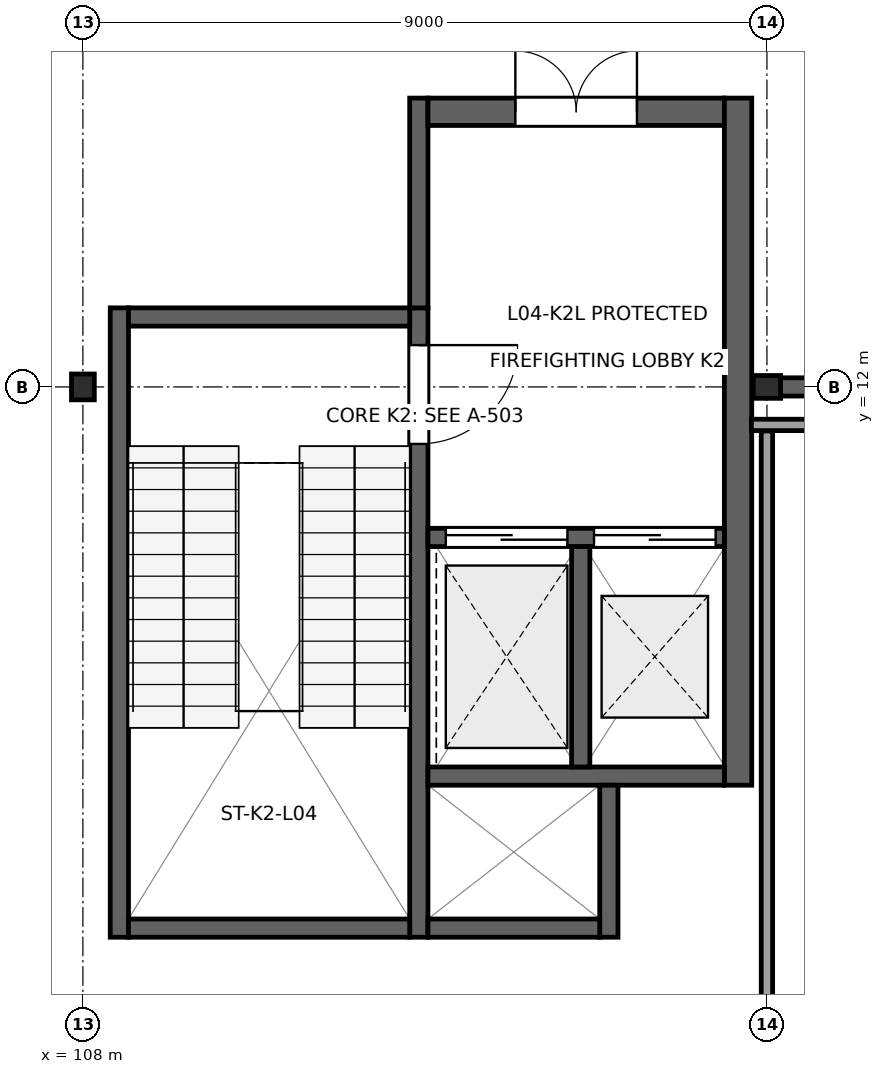
"""IFC4 building model, lengths in metres.
Left out: names, types, materials, properties, quantities, classifications, styles, units other than length and angle.
Written with IfcOpenShell. Run it as: python <this file> out.ifc"""

import sys

from ifc_helpers import new_model, si_unit, direction, frame, frame_2d, origin, origin_2d, place, context, subcontext, project, spatial, rectangle, i_section, extrude, element, fill, save


model = new_model("IFC4")
c1 = context("Model", 3, precision=1e-05, world=origin(), true_north=direction((0.0, 1.0)))
c2 = subcontext(c1, "Body", "Model", "MODEL_VIEW")
j1 = project(units=[si_unit("LENGTHUNIT", "METRE"), si_unit("PLANEANGLEUNIT", "RADIAN")], contexts=[c1])
p1 = place(None, origin())
s1 = spatial("IfcSite", under=j1, at=p1, CompositionType="ELEMENT")
p2 = place(p1, origin())
s2 = spatial("IfcBuilding", under=s1, at=p2, CompositionType="ELEMENT")
p3 = place(p2, frame((0.0, 0.0, 18.9)))
s3 = spatial("IfcBuildingStorey", under=s2, at=p3, CompositionType="ELEMENT", Elevation=18.9)
p4 = place(p3, frame((108.0, 12.0, 0.0), z_axis=(0.0, 0.0, 1.0), x_axis=(1.0, 0.0, 0.0)))
e1 = element("IfcColumn", 1, at=p4, inside=s3, PredefinedType="COLUMN", context=c2, shape_type="SweptSolid", body=[
    extrude(i_section(OverallWidth=0.3, OverallDepth=0.34, WebThickness=0.012, FlangeThickness=0.021, at=origin_2d()), origin(), (0.0, 0.0, 1.0), 4.5),
])
p5 = place(p3, frame((117.0, 12.0, 0.0), z_axis=(0.0, 0.0, 1.0), x_axis=(0.0, 1.0, 0.0)))
e2 = element("IfcColumn", 2, at=p5, inside=s3, PredefinedType="COLUMN", context=c2, shape_type="SweptSolid", body=[
    extrude(i_section(OverallWidth=0.3, OverallDepth=0.36, WebThickness=0.012, FlangeThickness=0.022, at=origin_2d()), origin(), (0.0, 0.0, 1.0), 4.5),
])
p6 = place(p3, frame((108.48, 4.76, 0.0), z_axis=(0.0, 0.0, 1.0), x_axis=(0.0, 1.0, 0.0)))
e3 = element("IfcWall", 3, at=p6, inside=s3, PredefinedType="SHEAR", context=c2, shape_type="SweptSolid", body=[
    extrude(rectangle(XDim=8.28, YDim=0.24, at=frame_2d((4.14, 0.0))), origin(), (0.0, 0.0, 1.0), 4.31),
])
p7 = place(p3, frame((112.42, 4.76, 0.0), z_axis=(0.0, 0.0, 1.0), x_axis=(0.0, 1.0, 0.0)))
e4 = element("IfcWall", 4, at=p7, inside=s3, PredefinedType="SHEAR", context=c2, shape_type="SweptSolid", body=[
    extrude(rectangle(XDim=8.28, YDim=0.24, at=frame_2d((4.14, 0.0))), origin(), (0.0, 0.0, 1.0), 4.31),
])
p8 = place(p7, frame((6.49, 0.0, 0.0)))
e5 = element("IfcOpeningElement", 5, at=p8, cuts=e4, PredefinedType="OPENING", context=c2, shape_type="SweptSolid", body=[
    extrude(rectangle(XDim=1.3, YDim=2.2, at=frame_2d((0.65, 1.1))), frame((0.0, 0.135, 0.0), z_axis=(0.0, -1.0, 0.0), x_axis=(1.0, 0.0, 0.0)), (0.0, 0.0, 1.0), 0.27),
])
for number, where, z_axis, x_axis in (
    (6, (108.6, 4.88, 0.0), (0.0, 0.0, 1.0), (1.0, 0.0, 0.0)),
    (7, (108.6, 12.92, 0.0), (0.0, 0.0, 1.0), (1.0, 0.0, 0.0)),
):
    element("IfcWall", number, at=place(p3, frame(where, z_axis=z_axis, x_axis=x_axis)), inside=s3, PredefinedType="SHEAR", context=c2, shape_type="SweptSolid", body=[
        extrude(rectangle(XDim=3.7, YDim=0.24, at=frame_2d((1.85, 0.0))), origin(), (0.0, 0.0, 1.0), 4.31),
    ])
p9 = place(p3, frame((112.42, 13.04, 0.0), z_axis=(0.0, 0.0, 1.0), x_axis=(0.0, 1.0, 0.0)))
e8 = element("IfcWall", 8, at=p9, inside=s3, PredefinedType="SHEAR", context=c2, shape_type="SweptSolid", body=[
    extrude(rectangle(XDim=2.76, YDim=0.24, at=frame_2d((1.38, 0.0))), origin(), (0.0, 0.0, 1.0), 4.16),
])
p10 = place(p3, frame((112.54, 15.62, 0.0), z_axis=(0.0, 0.0, 1.0), x_axis=(1.0, 0.0, 0.0)))
e9 = element("IfcWall", 9, at=p10, inside=s3, PredefinedType="SHEAR", context=c2, shape_type="SweptSolid", body=[
    extrude(rectangle(XDim=3.9, YDim=0.36, at=frame_2d((1.95, 0.0))), origin(), (0.0, 0.0, 1.0), 4.16),
])
p11 = place(p10, frame((1.15, 0.0, 0.0)))
e10 = element("IfcOpeningElement", 10, at=p11, cuts=e9, PredefinedType="OPENING", context=c2, shape_type="SweptSolid", body=[
    extrude(rectangle(XDim=1.6, YDim=2.25, at=frame_2d((0.8, 1.125))), frame((0.0, 0.195, 0.0), z_axis=(0.0, -1.0, 0.0), x_axis=(1.0, 0.0, 0.0)), (0.0, 0.0, 1.0), 0.39),
])
p12 = place(p3, frame((116.62, 6.76, 0.0), z_axis=(0.0, 0.0, 1.0), x_axis=(0.0, 1.0, 0.0)))
e11 = element("IfcWall", 11, at=p12, inside=s3, PredefinedType="SHEAR", context=c2, shape_type="SweptSolid", body=[
    extrude(rectangle(XDim=9.04, YDim=0.36, at=frame_2d((4.52, 0.0))), origin(), (0.0, 0.0, 1.0), 4.16),
])
p13 = place(p3, frame((112.54, 10.02, 0.0), z_axis=(0.0, 0.0, 1.0), x_axis=(1.0, 0.0, 0.0)))
e12 = element("IfcWall", 12, at=p13, inside=s3, PredefinedType="SHEAR", context=c2, shape_type="SweptSolid", body=[
    extrude(rectangle(XDim=3.9, YDim=0.24, at=frame_2d((1.95, 0.0))), origin(), (0.0, 0.0, 1.0), 4.31),
])
p14 = place(p13, frame((0.235, 0.0, 0.0)))
e13 = element("IfcOpeningElement", 13, at=p14, cuts=e12, PredefinedType="OPENING", context=c2, shape_type="SweptSolid", body=[
    extrude(rectangle(XDim=1.6, YDim=2.3, at=frame_2d((0.8, 1.15))), frame((0.0, 0.135, 0.0), z_axis=(0.0, -1.0, 0.0), x_axis=(1.0, 0.0, 0.0)), (0.0, 0.0, 1.0), 0.27),
])
p15 = place(p13, frame((2.185, 0.0, 0.0)))
e14 = element("IfcOpeningElement", 14, at=p15, cuts=e12, PredefinedType="OPENING", context=c2, shape_type="SweptSolid", body=[
    extrude(rectangle(XDim=1.6, YDim=2.3, at=frame_2d((0.8, 1.15))), frame((0.0, 0.135, 0.0), z_axis=(0.0, -1.0, 0.0), x_axis=(1.0, 0.0, 0.0)), (0.0, 0.0, 1.0), 0.27),
])
p16 = place(p3, frame((112.54, 6.88, 0.0), z_axis=(0.0, 0.0, 1.0), x_axis=(1.0, 0.0, 0.0)))
e15 = element("IfcWall", 15, at=p16, inside=s3, PredefinedType="SHEAR", context=c2, shape_type="SweptSolid", body=[
    extrude(rectangle(XDim=3.9, YDim=0.24, at=frame_2d((1.95, 0.0))), origin(), (0.0, 0.0, 1.0), 4.31),
])
p17 = place(p3, frame((114.55, 7.0, 0.0), z_axis=(0.0, 0.0, 1.0), x_axis=(0.0, 1.0, 0.0)))
e16 = element("IfcWall", 16, at=p17, inside=s3, PredefinedType="SHEAR", context=c2, shape_type="SweptSolid", body=[
    extrude(rectangle(XDim=2.9, YDim=0.24, at=frame_2d((1.45, 0.0))), origin(), (0.0, 0.0, 1.0), 4.31),
])
p18 = place(p3, frame((114.92, 4.76, 0.0), z_axis=(0.0, 0.0, 1.0), x_axis=(0.0, 1.0, 0.0)))
e17 = element("IfcWall", 17, at=p18, inside=s3, PredefinedType="SHEAR", context=c2, shape_type="SweptSolid", body=[
    extrude(rectangle(XDim=2.0, YDim=0.24, at=frame_2d((1.0, 0.0))), origin(), (0.0, 0.0, 1.0), 4.31),
])
p19 = place(p3, frame((112.54, 4.88, 0.0), z_axis=(0.0, 0.0, 1.0), x_axis=(1.0, 0.0, 0.0)))
e18 = element("IfcWall", 18, at=p19, inside=s3, PredefinedType="SHEAR", context=c2, shape_type="SweptSolid", body=[
    extrude(rectangle(XDim=2.26, YDim=0.24, at=frame_2d((1.13, 0.0))), origin(), (0.0, 0.0, 1.0), 4.31),
])
p20 = place(p3, frame((117.178, 12.0, 0.0), z_axis=(0.0, 0.0, 1.0), x_axis=(1.0, 0.0, 0.0)))
e19 = element("IfcWall", 19, at=p20, inside=s3, PredefinedType="SHEAR", context=c2, shape_type="SweptSolid", body=[
    extrude(rectangle(XDim=8.814, YDim=0.24, at=frame_2d((4.407, 0.0))), origin(), (0.0, 0.0, 1.0), 3.355),
])
p21 = place(p3, frame((117.0, 3.655, 0.0), z_axis=(0.0, 0.0, 1.0), x_axis=(0.0, 1.0, 0.0)))
e20 = element("IfcWall", 20, at=p21, inside=s3, PredefinedType="PARTITIONING", context=c2, shape_type="SweptSolid", body=[
    extrude(rectangle(XDim=7.765, YDim=0.15, at=frame_2d((3.882, 0.0))), origin(), (0.0, 0.0, 1.0), 3.905),
])
p22 = place(p3, frame((116.795, 11.5, 0.0), z_axis=(0.0, 0.0, 1.0), x_axis=(1.0, 0.0, 0.0)))
e21 = element("IfcWall", 21, at=p22, inside=s3, PredefinedType="PARTITIONING", context=c2, shape_type="SweptSolid", body=[
    extrude(rectangle(XDim=9.425, YDim=0.15, at=frame_2d((4.712, 0.0))), origin(), (0.0, 0.0, 1.0), 4.14),
])
p23 = place(p8, frame((1.3, 0.0, 0.0), z_axis=(0.0, 0.0, 1.0), x_axis=(-1.0, 0.0, 0.0)))
e22 = element("IfcDoor", 22, at=p23, inside=s3, OperationType="SINGLE_SWING_RIGHT", PredefinedType="DOOR", context=c2, shape_type="SweptSolid", body=[
    extrude(rectangle(XDim=1.3, YDim=2.2, at=frame_2d((0.65, 1.1))), frame((0.0, 0.025, 0.0), z_axis=(0.0, -1.0, 0.0), x_axis=(1.0, 0.0, 0.0)), (0.0, 0.0, 1.0), 0.05),
])
fill(e5, e22)
p24 = place(p11, origin())
e23 = element("IfcDoor", 23, at=p24, inside=s3, OperationType="DOUBLE_DOOR_SINGLE_SWING", PredefinedType="DOOR", context=c2, shape_type="SweptSolid", body=[
    extrude(rectangle(XDim=1.6, YDim=2.25, at=frame_2d((0.8, 1.125))), frame((0.0, 0.025, 0.0), z_axis=(0.0, -1.0, 0.0), x_axis=(1.0, 0.0, 0.0)), (0.0, 0.0, 1.0), 0.05),
])
fill(e10, e23)
p25 = place(p14, origin())
e24 = element("IfcDoor", 24, at=p25, inside=s3, OperationType="DOUBLE_DOOR_SLIDING", PredefinedType="DOOR", context=c2, shape_type="SweptSolid", body=[
    extrude(rectangle(XDim=1.6, YDim=2.3, at=frame_2d((0.8, 1.15))), frame((0.0, 0.025, 0.0), z_axis=(0.0, -1.0, 0.0), x_axis=(1.0, 0.0, 0.0)), (0.0, 0.0, 1.0), 0.05),
])
fill(e13, e24)
p26 = place(p15, origin())
e25 = element("IfcDoor", 25, at=p26, inside=s3, OperationType="DOUBLE_DOOR_SLIDING", PredefinedType="DOOR", context=c2, shape_type="SweptSolid", body=[
    extrude(rectangle(XDim=1.6, YDim=2.3, at=frame_2d((0.8, 1.15))), frame((0.0, 0.025, 0.0), z_axis=(0.0, -1.0, 0.0), x_axis=(1.0, 0.0, 0.0)), (0.0, 0.0, 1.0), 0.05),
])
fill(e14, e25)
save(model, sys.argv[1])
